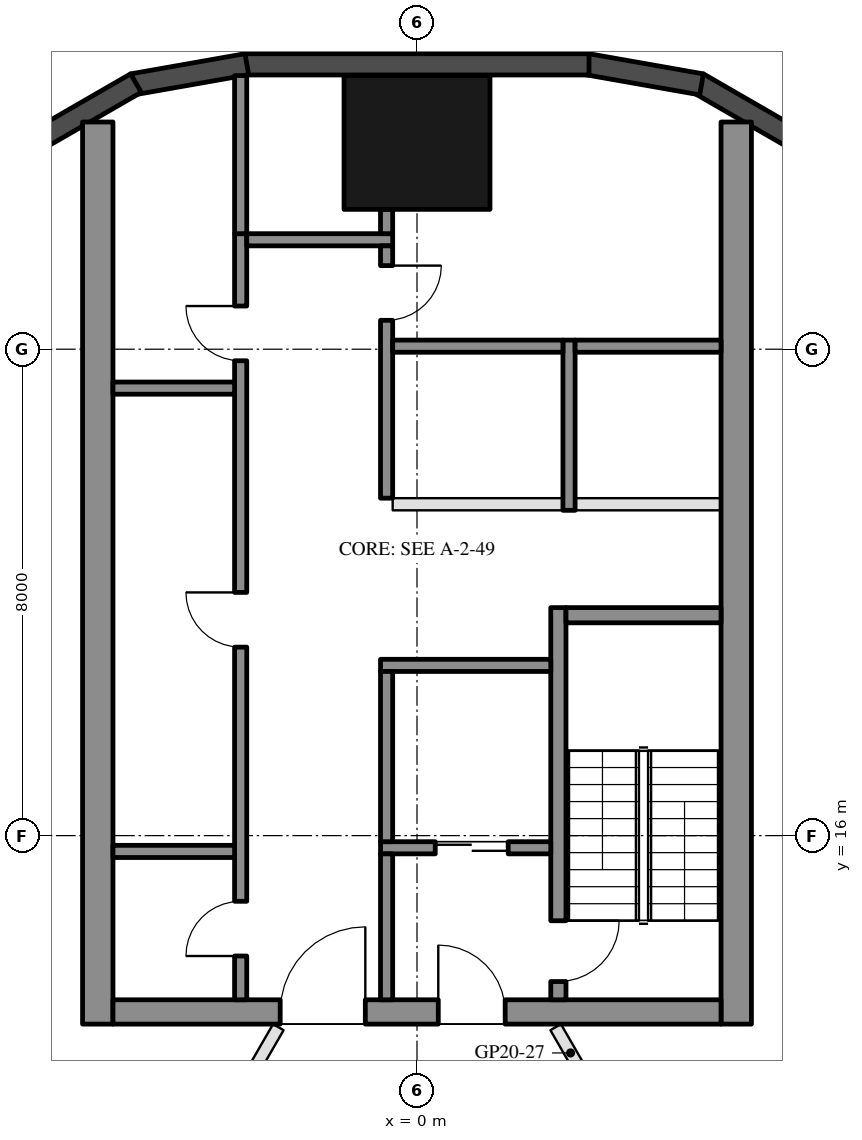
"""IFC4 building model, lengths in metres.
Left out: names, types, materials, properties, quantities, classifications, styles, units other than length and angle.
Written with IfcOpenShell. Run it as: python <this file> out.ifc"""

import sys

from ifc_helpers import new_model, si_unit, direction, frame, frame_2d, origin, origin_2d, place, context, subcontext, project, spatial, rectangle, hollow_rectangle, extrude, element, fill, save


model = new_model("IFC4")
c1 = context("Model", 3, precision=1e-05, world=origin(), true_north=direction((0.0, 1.0)))
c2 = subcontext(c1, "Body", "Model", "MODEL_VIEW")
j1 = project(units=[si_unit("LENGTHUNIT", "METRE"), si_unit("PLANEANGLEUNIT", "RADIAN")], contexts=[c1])
p1 = place(None, origin())
s1 = spatial("IfcSite", under=j1, at=p1, CompositionType="ELEMENT")
p2 = place(p1, origin())
s2 = spatial("IfcBuilding", under=s1, at=p2, CompositionType="ELEMENT")
p3 = place(p2, frame((0.0, 0.0, 213.2)))
s3 = spatial("IfcBuildingStorey", under=s2, at=p3, CompositionType="ELEMENT", Elevation=213.2)
p4 = place(p3, frame((0.0, 27.4, 0.0), z_axis=(0.0, 0.0, 1.0), x_axis=(1.0, 0.0, 0.0)))
e1 = element("IfcColumn", 1, at=p4, inside=s3, PredefinedType="COLUMN", context=c2, shape_type="SweptSolid", body=[
    extrude(hollow_rectangle(XDim=2.4, YDim=2.2, WallThickness=0.06, at=origin_2d()), origin(), (0.0, 0.0, 1.0), 3.7),
])
for number, where, z_axis, x_axis in (
    (2, (6.277, 27.422, 0.0), (0.0, 0.0, 1.0), (-0.866, 0.5, 0.0)),
    (3, (4.68, 28.356, 0.0), (0.0, 0.0, 1.0), (-0.985, 0.174, 0.0)),
):
    element("IfcWall", number, at=place(p3, frame(where, z_axis=z_axis, x_axis=x_axis)), inside=s3, PredefinedType="SOLIDWALL", context=c2, shape_type="SweptSolid", body=[
        extrude(rectangle(XDim=1.91, YDim=0.35, at=frame_2d((0.955, 0.0))), origin(), (0.0, 0.0, 1.0), 3.55),
    ])
p5 = place(p3, frame((2.829, 28.685, 0.0), z_axis=(0.0, 0.0, 1.0), x_axis=(-1.0, 0.0, 0.0)))
e4 = element("IfcWall", 4, at=p5, inside=s3, PredefinedType="SOLIDWALL", context=c2, shape_type="SweptSolid", body=[
    extrude(rectangle(XDim=5.658, YDim=0.35, at=frame_2d((2.829, 0.0))), origin(), (0.0, 0.0, 1.0), 3.55),
])
for number, where, z_axis, x_axis in (
    (5, (-2.799, 28.688, 0.0), (0.0, 0.0, 1.0), (-0.985, -0.174, 0.0)),
    (6, (-4.623, 28.377, 0.0), (0.0, 0.0, 1.0), (-0.866, -0.5, 0.0)),
):
    element("IfcWall", number, at=place(p3, frame(where, z_axis=z_axis, x_axis=x_axis)), inside=s3, PredefinedType="SOLIDWALL", context=c2, shape_type="SweptSolid", body=[
        extrude(rectangle(XDim=1.91, YDim=0.35, at=frame_2d((0.955, 0.0))), origin(), (0.0, 0.0, 1.0), 3.55),
    ])
for number, where, z_axis, x_axis in (
    (7, (5.25, 12.9, 0.0), (0.0, 0.0, 1.0), (0.0, 1.0, 0.0)),
    (8, (-5.25, 12.9, 0.0), (0.0, 0.0, 1.0), (0.0, 1.0, 0.0)),
):
    element("IfcWall", number, at=place(p3, frame(where, z_axis=z_axis, x_axis=x_axis)), inside=s3, PredefinedType="SHEAR", context=c2, shape_type="SweptSolid", body=[
        extrude(rectangle(XDim=14.837, YDim=0.5, at=frame_2d((7.418, 0.0))), origin(), (0.0, 0.0, 1.0), 3.5),
    ])
p6 = place(p3, frame((5.0, 13.1, 0.0), z_axis=(0.0, 0.0, 1.0), x_axis=(-1.0, 0.0, 0.0)))
e9 = element("IfcWall", 9, at=p6, inside=s3, PredefinedType="SHEAR", context=c2, shape_type="SweptSolid", body=[
    extrude(rectangle(XDim=10.0, YDim=0.4, at=frame_2d((5.0, 0.0))), origin(), (0.0, 0.0, 1.0), 3.5),
])
p7 = place(p6, frame((3.55, 0.0, 0.0)))
e10 = element("IfcOpeningElement", 10, at=p7, cuts=e9, PredefinedType="OPENING", context=c2, shape_type="SweptSolid", body=[
    extrude(rectangle(XDim=1.1, YDim=2.1, at=frame_2d((0.55, 1.05))), frame((0.0, 0.21, 0.0), z_axis=(0.0, -1.0, 0.0), x_axis=(1.0, 0.0, 0.0)), (0.0, 0.0, 1.0), 0.42),
])
p8 = place(p6, frame((5.85, 0.0, 0.0)))
e11 = element("IfcOpeningElement", 11, at=p8, cuts=e9, PredefinedType="OPENING", context=c2, shape_type="SweptSolid", body=[
    extrude(rectangle(XDim=1.4, YDim=2.1, at=frame_2d((0.7, 1.05))), frame((0.0, 0.21, 0.0), z_axis=(0.0, -1.0, 0.0), x_axis=(1.0, 0.0, 0.0)), (0.0, 0.0, 1.0), 0.42),
])
p9 = place(p3, frame((2.325, 13.3, 0.0), z_axis=(0.0, 0.0, 1.0), x_axis=(0.0, 1.0, 0.0)))
e12 = element("IfcWall", 12, at=p9, inside=s3, PredefinedType="SHEAR", context=c2, shape_type="SweptSolid", body=[
    extrude(rectangle(XDim=6.45, YDim=0.25, at=frame_2d((3.225, 0.0))), origin(), (0.0, 0.0, 1.0), 3.5),
])
p10 = place(p9, frame((0.3, 0.0, 0.0)))
e13 = element("IfcOpeningElement", 13, at=p10, cuts=e12, PredefinedType="OPENING", context=c2, shape_type="SweptSolid", body=[
    extrude(rectangle(XDim=1.0, YDim=2.1, at=frame_2d((0.5, 1.05))), frame((0.0, 0.135, 0.0), z_axis=(0.0, -1.0, 0.0), x_axis=(1.0, 0.0, 0.0)), (0.0, 0.0, 1.0), 0.27),
])
p11 = place(p3, frame((5.0, 19.625, 0.0), z_axis=(0.0, 0.0, 1.0), x_axis=(-1.0, 0.0, 0.0)))
e14 = element("IfcWall", 14, at=p11, inside=s3, PredefinedType="SHEAR", context=c2, shape_type="SweptSolid", body=[
    extrude(rectangle(XDim=2.55, YDim=0.25, at=frame_2d((1.275, 0.0))), origin(), (0.0, 0.0, 1.0), 3.5),
])
p12 = place(p3, frame((2.2, 18.8, 0.0), z_axis=(0.0, 0.0, 1.0), x_axis=(-1.0, 0.0, 0.0)))
e15 = element("IfcWall", 15, at=p12, inside=s3, PredefinedType="SHEAR", context=c2, shape_type="SweptSolid", body=[
    extrude(rectangle(XDim=2.8, YDim=0.2, at=frame_2d((1.4, 0.0))), origin(), (0.0, 0.0, 1.0), 3.5),
])
p13 = place(p3, frame((2.2, 15.8, 0.0), z_axis=(0.0, 0.0, 1.0), x_axis=(-1.0, 0.0, 0.0)))
e16 = element("IfcWall", 16, at=p13, inside=s3, PredefinedType="SHEAR", context=c2, shape_type="SweptSolid", body=[
    extrude(rectangle(XDim=2.8, YDim=0.2, at=frame_2d((1.4, 0.0))), origin(), (0.0, 0.0, 1.0), 3.5),
])
p14 = place(p13, frame((0.7, 0.0, 0.0)))
e17 = element("IfcOpeningElement", 17, at=p14, cuts=e16, PredefinedType="OPENING", context=c2, shape_type="SweptSolid", body=[
    extrude(rectangle(XDim=1.2, YDim=2.1, at=frame_2d((0.6, 1.05))), frame((0.0, 0.11, 0.0), z_axis=(0.0, -1.0, 0.0), x_axis=(1.0, 0.0, 0.0)), (0.0, 0.0, 1.0), 0.22),
])
p15 = place(p3, frame((-0.5, 15.9, 0.0), z_axis=(0.0, 0.0, 1.0), x_axis=(0.0, 1.0, 0.0)))
e18 = element("IfcWall", 18, at=p15, inside=s3, PredefinedType="SHEAR", context=c2, shape_type="SweptSolid", body=[
    extrude(rectangle(XDim=2.8, YDim=0.2, at=frame_2d((1.4, 0.0))), origin(), (0.0, 0.0, 1.0), 3.5),
])
p16 = place(p3, frame((-0.5, 13.3, 0.0), z_axis=(0.0, 0.0, 1.0), x_axis=(0.0, 1.0, 0.0)))
e19 = element("IfcWall", 19, at=p16, inside=s3, PredefinedType="SHEAR", context=c2, shape_type="SweptSolid", body=[
    extrude(rectangle(XDim=2.4, YDim=0.2, at=frame_2d((1.2, 0.0))), origin(), (0.0, 0.0, 1.0), 3.5),
])
p17 = place(p3, frame((-2.9, 13.3, 0.0), z_axis=(0.0, 0.0, 1.0), x_axis=(0.0, 1.0, 0.0)))
e20 = element("IfcWall", 20, at=p17, inside=s3, PredefinedType="SHEAR", context=c2, shape_type="SweptSolid", body=[
    extrude(rectangle(XDim=12.6, YDim=0.2, at=frame_2d((6.3, 0.0))), origin(), (0.0, 0.0, 1.0), 3.5),
])
p18 = place(p17, frame((0.72, 0.0, 0.0)))
e21 = element("IfcOpeningElement", 21, at=p18, cuts=e20, PredefinedType="OPENING", context=c2, shape_type="SweptSolid", body=[
    extrude(rectangle(XDim=0.9, YDim=2.1, at=frame_2d((0.45, 1.05))), frame((0.0, 0.11, 0.0), z_axis=(0.0, -1.0, 0.0), x_axis=(1.0, 0.0, 0.0)), (0.0, 0.0, 1.0), 0.22),
])
p19 = place(p17, frame((5.8, 0.0, 0.0)))
e22 = element("IfcOpeningElement", 22, at=p19, cuts=e20, PredefinedType="OPENING", context=c2, shape_type="SweptSolid", body=[
    extrude(rectangle(XDim=0.9, YDim=2.1, at=frame_2d((0.45, 1.05))), frame((0.0, 0.11, 0.0), z_axis=(0.0, -1.0, 0.0), x_axis=(1.0, 0.0, 0.0)), (0.0, 0.0, 1.0), 0.22),
])
p20 = place(p17, frame((10.51, 0.0, 0.0)))
e23 = element("IfcOpeningElement", 23, at=p20, cuts=e20, PredefinedType="OPENING", context=c2, shape_type="SweptSolid", body=[
    extrude(rectangle(XDim=0.9, YDim=2.1, at=frame_2d((0.45, 1.05))), frame((0.0, 0.11, 0.0), z_axis=(0.0, -1.0, 0.0), x_axis=(1.0, 0.0, 0.0)), (0.0, 0.0, 1.0), 0.22),
])
p21 = place(p3, frame((-0.4, 25.8, 0.0), z_axis=(0.0, 0.0, 1.0), x_axis=(-1.0, 0.0, 0.0)))
e24 = element("IfcWall", 24, at=p21, inside=s3, PredefinedType="SHEAR", context=c2, shape_type="SweptSolid", body=[
    extrude(rectangle(XDim=2.4, YDim=0.2, at=frame_2d((1.2, 0.0))), origin(), (0.0, 0.0, 1.0), 3.5),
])
p22 = place(p3, frame((-0.5, 21.55, 0.0), z_axis=(0.0, 0.0, 1.0), x_axis=(0.0, 1.0, 0.0)))
e25 = element("IfcWall", 25, at=p22, inside=s3, PredefinedType="SHEAR", context=c2, shape_type="SweptSolid", body=[
    extrude(rectangle(XDim=4.15, YDim=0.2, at=frame_2d((2.075, 0.0))), origin(), (0.0, 0.0, 1.0), 3.5),
])
p23 = place(p22, frame((2.925, 0.0, 0.0)))
e26 = element("IfcOpeningElement", 26, at=p23, cuts=e25, PredefinedType="OPENING", context=c2, shape_type="SweptSolid", body=[
    extrude(rectangle(XDim=0.9, YDim=2.1, at=frame_2d((0.45, 1.05))), frame((0.0, 0.11, 0.0), z_axis=(0.0, -1.0, 0.0), x_axis=(1.0, 0.0, 0.0)), (0.0, 0.0, 1.0), 0.22),
])
for number, where, z_axis, x_axis in (
    (27, (-3.0, 15.74, 0.0), (0.0, 0.0, 1.0), (-1.0, 0.0, 0.0)),
    (28, (-3.0, 23.36, 0.0), (0.0, 0.0, 1.0), (-1.0, 0.0, 0.0)),
):
    element("IfcWall", number, at=place(p3, frame(where, z_axis=z_axis, x_axis=x_axis)), inside=s3, PredefinedType="SHEAR", context=c2, shape_type="SweptSolid", body=[
        extrude(rectangle(XDim=2.0, YDim=0.2, at=frame_2d((1.0, 0.0))), origin(), (0.0, 0.0, 1.0), 3.5),
    ])
p24 = place(p3, frame((-0.5, 25.9, 0.0), z_axis=(0.0, 0.0, 1.0), x_axis=(0.0, 1.0, 0.0)))
e29 = element("IfcWall", 29, at=p24, inside=s3, PredefinedType="SHEAR", context=c2, shape_type="SweptSolid", body=[
    extrude(rectangle(XDim=0.4, YDim=0.2, at=frame_2d((0.2, 0.0))), origin(), (0.0, 0.0, 1.0), 3.5),
])
p25 = place(p3, frame((-2.9, 25.9, 0.0), z_axis=(0.0, 0.0, 1.0), x_axis=(0.0, 1.0, 0.0)))
e30 = element("IfcWall", 30, at=p25, inside=s3, PredefinedType="SHEAR", context=c2, shape_type="SweptSolid", body=[
    extrude(rectangle(XDim=2.6, YDim=0.2, at=frame_2d((1.3, 0.0))), origin(), (0.0, 0.0, 1.0), 3.5),
])
p26 = place(p3, frame((2.5, 21.35, 0.0), z_axis=(0.0, 0.0, 1.0), x_axis=(0.0, 1.0, 0.0)))
e31 = element("IfcWall", 31, at=p26, inside=s3, PredefinedType="SHEAR", context=c2, shape_type="SweptSolid", body=[
    extrude(rectangle(XDim=2.8, YDim=0.2, at=frame_2d((1.4, 0.0))), origin(), (0.0, 0.0, 1.0), 3.5),
])
p27 = place(p3, frame((5.0, 24.05, 0.0), z_axis=(0.0, 0.0, 1.0), x_axis=(-1.0, 0.0, 0.0)))
e32 = element("IfcWall", 32, at=p27, inside=s3, PredefinedType="SHEAR", context=c2, shape_type="SweptSolid", body=[
    extrude(rectangle(XDim=2.4, YDim=0.2, at=frame_2d((1.2, 0.0))), origin(), (0.0, 0.0, 1.0), 3.5),
])
p28 = place(p3, frame((2.4, 24.05, 0.0), z_axis=(0.0, 0.0, 1.0), x_axis=(-1.0, 0.0, 0.0)))
e33 = element("IfcWall", 33, at=p28, inside=s3, PredefinedType="SHEAR", context=c2, shape_type="SweptSolid", body=[
    extrude(rectangle(XDim=2.8, YDim=0.2, at=frame_2d((1.4, 0.0))), origin(), (0.0, 0.0, 1.0), 3.5),
])
p29 = place(p3, frame((5.0, 21.45, 0.0), z_axis=(0.0, 0.0, 1.0), x_axis=(-1.0, 0.0, 0.0)))
e34 = element("IfcWall", 34, at=p29, inside=s3, PredefinedType="PARTITIONING", context=c2, shape_type="SweptSolid", body=[
    extrude(rectangle(XDim=2.4, YDim=0.2, at=frame_2d((1.2, 0.0))), origin(), (0.0, 0.0, 1.0), 3.5),
])
p30 = place(p3, frame((2.4, 21.45, 0.0), z_axis=(0.0, 0.0, 1.0), x_axis=(-1.0, 0.0, 0.0)))
e35 = element("IfcWall", 35, at=p30, inside=s3, PredefinedType="PARTITIONING", context=c2, shape_type="SweptSolid", body=[
    extrude(rectangle(XDim=2.8, YDim=0.2, at=frame_2d((1.4, 0.0))), origin(), (0.0, 0.0, 1.0), 3.5),
])
p31 = place(p3, frame((14.087, 14.161, 0.0), z_axis=(0.0, 0.0, 1.0), x_axis=(-0.891639053189, -0.452746947895, 0.0)))
e36 = element("IfcWall", 36, at=p31, inside=s3, PredefinedType="PARTITIONING", context=c2, shape_type="SweptSolid", body=[
    extrude(rectangle(XDim=10.996, YDim=0.2, at=frame_2d((5.498, 0.0))), origin(), (0.0, 0.0, 1.0), 3.06),
])
p32 = place(p3, frame((-13.018, 14.213, 0.0), z_axis=(0.0, 0.0, 1.0), x_axis=(0.866022637375, -0.500004791531, 0.0)))
e37 = element("IfcWall", 37, at=p32, inside=s3, PredefinedType="PARTITIONING", context=c2, shape_type="SweptSolid", body=[
    extrude(rectangle(XDim=10.08, YDim=0.2, at=frame_2d((5.04, 0.0))), origin(), (0.0, 0.0, 1.0), 3.06),
])
p33 = place(p3, frame((2.281, 12.85, 0.0), z_axis=(0.0, 0.0, 1.0), x_axis=(0.500010586081, -0.866019291821, 0.0)))
e38 = element("IfcWall", 38, at=p33, inside=s3, PredefinedType="PARTITIONING", context=c2, shape_type="SweptSolid", body=[
    extrude(rectangle(XDim=4.083, YDim=0.2, at=frame_2d((2.042, 0.0))), origin(), (0.0, 0.0, 1.0), 2.95),
])
p34 = place(p33, frame((1.541, 0.0, 0.0)))
e39 = element("IfcOpeningElement", 39, at=p34, cuts=e38, PredefinedType="OPENING", context=c2, shape_type="SweptSolid", body=[
    extrude(rectangle(XDim=1.0, YDim=2.1, at=frame_2d((0.5, 1.05))), frame((0.0, 0.11, 0.0), z_axis=(0.0, -1.0, 0.0), x_axis=(1.0, 0.0, 0.0)), (0.0, 0.0, 1.0), 0.22),
])
p35 = place(p3, frame((-4.325, 9.31, 0.0), z_axis=(0.0, 0.0, 1.0), x_axis=(0.500011931275, 0.86601851515, 0.0)))
e40 = element("IfcWall", 40, at=p35, inside=s3, PredefinedType="PARTITIONING", context=c2, shape_type="SweptSolid", body=[
    extrude(rectangle(XDim=4.088, YDim=0.2, at=frame_2d((2.044, 0.0))), origin(), (0.0, 0.0, 1.0), 2.95),
])
p36 = place(p35, frame((1.544, 0.0, 0.0)))
e41 = element("IfcOpeningElement", 41, at=p36, cuts=e40, PredefinedType="OPENING", context=c2, shape_type="SweptSolid", body=[
    extrude(rectangle(XDim=1.0, YDim=2.1, at=frame_2d((0.5, 1.05))), frame((0.0, 0.11, 0.0), z_axis=(0.0, -1.0, 0.0), x_axis=(1.0, 0.0, 0.0)), (0.0, 0.0, 1.0), 0.22),
])
p37 = place(p14, origin())
e42 = element("IfcDoor", 42, at=p37, inside=s3, OperationType="DOUBLE_DOOR_SLIDING", PredefinedType="DOOR", context=c2, shape_type="SweptSolid", body=[
    extrude(rectangle(XDim=1.2, YDim=2.1, at=frame_2d((0.6, 1.05))), frame((0.0, 0.025, 0.0), z_axis=(0.0, -1.0, 0.0), x_axis=(1.0, 0.0, 0.0)), (0.0, 0.0, 1.0), 0.05),
])
fill(e17, e42)
p38 = place(p18, origin())
e43 = element("IfcDoor", 43, at=p38, inside=s3, OperationType="SINGLE_SWING_LEFT", PredefinedType="DOOR", context=c2, shape_type="SweptSolid", body=[
    extrude(rectangle(XDim=0.9, YDim=2.1, at=frame_2d((0.45, 1.05))), frame((0.0, 0.025, 0.0), z_axis=(0.0, -1.0, 0.0), x_axis=(1.0, 0.0, 0.0)), (0.0, 0.0, 1.0), 0.05),
])
fill(e21, e43)
p39 = place(p19, origin())
e44 = element("IfcDoor", 44, at=p39, inside=s3, OperationType="SINGLE_SWING_RIGHT", PredefinedType="DOOR", context=c2, shape_type="SweptSolid", body=[
    extrude(rectangle(XDim=0.9, YDim=2.1, at=frame_2d((0.45, 1.05))), frame((0.0, 0.025, 0.0), z_axis=(0.0, -1.0, 0.0), x_axis=(1.0, 0.0, 0.0)), (0.0, 0.0, 1.0), 0.05),
])
fill(e22, e44)
p40 = place(p20, origin())
e45 = element("IfcDoor", 45, at=p40, inside=s3, OperationType="SINGLE_SWING_RIGHT", PredefinedType="DOOR", context=c2, shape_type="SweptSolid", body=[
    extrude(rectangle(XDim=0.9, YDim=2.1, at=frame_2d((0.45, 1.05))), frame((0.0, 0.025, 0.0), z_axis=(0.0, -1.0, 0.0), x_axis=(1.0, 0.0, 0.0)), (0.0, 0.0, 1.0), 0.05),
])
fill(e23, e45)
p41 = place(p23, frame((0.9, 0.0, 0.0), z_axis=(0.0, 0.0, 1.0), x_axis=(-1.0, 0.0, 0.0)))
e46 = element("IfcDoor", 46, at=p41, inside=s3, OperationType="SINGLE_SWING_LEFT", PredefinedType="DOOR", context=c2, shape_type="SweptSolid", body=[
    extrude(rectangle(XDim=0.9, YDim=2.1, at=frame_2d((0.45, 1.05))), frame((0.0, 0.025, 0.0), z_axis=(0.0, -1.0, 0.0), x_axis=(1.0, 0.0, 0.0)), (0.0, 0.0, 1.0), 0.05),
])
fill(e26, e46)
p42 = place(p7, frame((1.1, 0.0, 0.0), z_axis=(0.0, 0.0, 1.0), x_axis=(-1.0, 0.0, 0.0)))
e47 = element("IfcDoor", 47, at=p42, inside=s3, OperationType="SINGLE_SWING_LEFT", PredefinedType="DOOR", context=c2, shape_type="SweptSolid", body=[
    extrude(rectangle(XDim=1.1, YDim=2.1, at=frame_2d((0.55, 1.05))), frame((0.0, 0.025, 0.0), z_axis=(0.0, -1.0, 0.0), x_axis=(1.0, 0.0, 0.0)), (0.0, 0.0, 1.0), 0.05),
])
fill(e10, e47)
p43 = place(p8, frame((1.4, 0.0, 0.0), z_axis=(0.0, 0.0, 1.0), x_axis=(-1.0, 0.0, 0.0)))
e48 = element("IfcDoor", 48, at=p43, inside=s3, OperationType="DOUBLE_DOOR_SINGLE_SWING", PredefinedType="DOOR", context=c2, shape_type="SweptSolid", body=[
    extrude(rectangle(XDim=1.4, YDim=2.1, at=frame_2d((0.7, 1.05))), frame((0.0, 0.025, 0.0), z_axis=(0.0, -1.0, 0.0), x_axis=(1.0, 0.0, 0.0)), (0.0, 0.0, 1.0), 0.05),
])
fill(e11, e48)
p44 = place(p10, frame((1.0, 0.0, 0.0), z_axis=(0.0, 0.0, 1.0), x_axis=(-1.0, 0.0, 0.0)))
e49 = element("IfcDoor", 49, at=p44, inside=s3, OperationType="SINGLE_SWING_LEFT", PredefinedType="DOOR", context=c2, shape_type="SweptSolid", body=[
    extrude(rectangle(XDim=1.0, YDim=2.1, at=frame_2d((0.5, 1.05))), frame((0.0, 0.025, 0.0), z_axis=(0.0, -1.0, 0.0), x_axis=(1.0, 0.0, 0.0)), (0.0, 0.0, 1.0), 0.05),
])
fill(e13, e49)
save(model, sys.argv[1])
